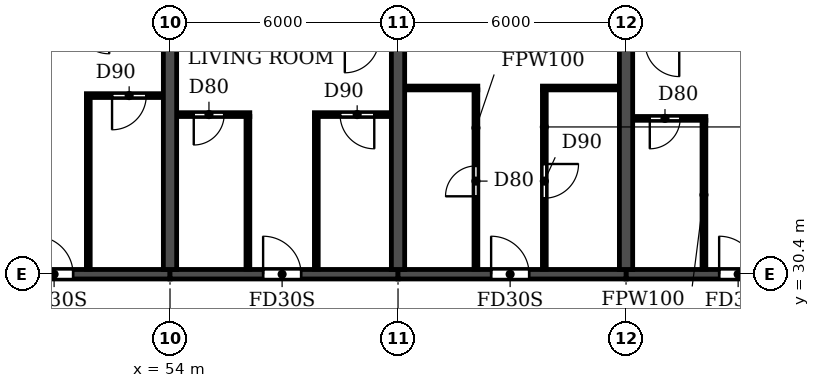
"""IFC4 building model, lengths in metres.
Left out: names, types, materials, properties, quantities, classifications, styles, units other than length and angle.
Written with IfcOpenShell. Run it as: python <this file> out.ifc"""

import sys

from ifc_helpers import new_model, si_unit, direction, frame, frame_2d, origin, place, context, subcontext, project, spatial, rectangle, extrude, element, fill, save


model = new_model("IFC4")
c1 = context("Model", 3, precision=1e-05, world=origin(), true_north=direction((0.0, 1.0)))
c2 = subcontext(c1, "Body", "Model", "MODEL_VIEW")
j1 = project(units=[si_unit("LENGTHUNIT", "METRE"), si_unit("PLANEANGLEUNIT", "RADIAN")], contexts=[c1])
p1 = place(None, origin())
s1 = spatial("IfcSite", under=j1, at=p1, CompositionType="ELEMENT")
p2 = place(p1, origin())
s2 = spatial("IfcBuilding", under=s1, at=p2, CompositionType="ELEMENT")
p3 = place(p2, frame((0.0, 0.0, 112.5)))
s3 = spatial("IfcBuildingStorey", under=s2, at=p3, CompositionType="ELEMENT", Elevation=112.5)
for number, where, z_axis, x_axis in (
    (1, (54.0, 30.525, 0.0), (0.0, 0.0, 1.0), (0.0, 1.0, 0.0)),
    (2, (60.0, 30.525, 0.0), (0.0, 0.0, 1.0), (0.0, 1.0, 0.0)),
    (3, (66.0, 30.525, 0.0), (0.0, 0.0, 1.0), (0.0, 1.0, 0.0)),
):
    element("IfcWall", number, at=place(p3, frame(where, z_axis=z_axis, x_axis=x_axis)), inside=s3, PredefinedType="SHEAR", context=c2, shape_type="SweptSolid", body=[
        extrude(rectangle(XDim=12.875, YDim=0.35, at=frame_2d((6.438, 0.0))), origin(), (0.0, 0.0, 1.0), 2.95),
    ])
p4 = place(p3, frame((48.0, 30.4, 0.0), z_axis=(0.0, 0.0, 1.0), x_axis=(1.0, 0.0, 0.0)))
e4 = element("IfcWall", 4, at=p4, inside=s3, PredefinedType="SHEAR", context=c2, shape_type="SweptSolid", body=[
    extrude(rectangle(XDim=6.0, YDim=0.25, at=frame_2d((3.0, 0.0))), origin(), (0.0, 0.0, 1.0), 2.35),
])
p5 = place(p4, frame((2.45, 0.0, 0.0)))
e5 = element("IfcOpeningElement", 5, at=p5, cuts=e4, PredefinedType="OPENING", context=c2, shape_type="SweptSolid", body=[
    extrude(rectangle(XDim=1.0, YDim=2.1, at=frame_2d((0.5, 1.05))), frame((0.0, 0.135, 0.0), z_axis=(0.0, -1.0, 0.0), x_axis=(1.0, 0.0, 0.0)), (0.0, 0.0, 1.0), 0.27),
])
p6 = place(p3, frame((54.0, 30.4, 0.0), z_axis=(0.0, 0.0, 1.0), x_axis=(1.0, 0.0, 0.0)))
e6 = element("IfcWall", 6, at=p6, inside=s3, PredefinedType="SHEAR", context=c2, shape_type="SweptSolid", body=[
    extrude(rectangle(XDim=6.0, YDim=0.25, at=frame_2d((3.0, 0.0))), origin(), (0.0, 0.0, 1.0), 2.35),
])
p7 = place(p6, frame((2.45, 0.0, 0.0)))
e7 = element("IfcOpeningElement", 7, at=p7, cuts=e6, PredefinedType="OPENING", context=c2, shape_type="SweptSolid", body=[
    extrude(rectangle(XDim=1.0, YDim=2.1, at=frame_2d((0.5, 1.05))), frame((0.0, 0.135, 0.0), z_axis=(0.0, -1.0, 0.0), x_axis=(1.0, 0.0, 0.0)), (0.0, 0.0, 1.0), 0.27),
])
p8 = place(p3, frame((60.0, 30.4, 0.0), z_axis=(0.0, 0.0, 1.0), x_axis=(1.0, 0.0, 0.0)))
e8 = element("IfcWall", 8, at=p8, inside=s3, PredefinedType="SHEAR", context=c2, shape_type="SweptSolid", body=[
    extrude(rectangle(XDim=6.0, YDim=0.25, at=frame_2d((3.0, 0.0))), origin(), (0.0, 0.0, 1.0), 2.35),
])
p9 = place(p8, frame((2.45, 0.0, 0.0)))
e9 = element("IfcOpeningElement", 9, at=p9, cuts=e8, PredefinedType="OPENING", context=c2, shape_type="SweptSolid", body=[
    extrude(rectangle(XDim=1.0, YDim=2.1, at=frame_2d((0.5, 1.05))), frame((0.0, 0.135, 0.0), z_axis=(0.0, -1.0, 0.0), x_axis=(1.0, 0.0, 0.0)), (0.0, 0.0, 1.0), 0.27),
])
p10 = place(p3, frame((66.0, 30.4, 0.0), z_axis=(0.0, 0.0, 1.0), x_axis=(1.0, 0.0, 0.0)))
e10 = element("IfcWall", 10, at=p10, inside=s3, PredefinedType="SHEAR", context=c2, shape_type="SweptSolid", body=[
    extrude(rectangle(XDim=6.0, YDim=0.25, at=frame_2d((3.0, 0.0))), origin(), (0.0, 0.0, 1.0), 2.35),
])
p11 = place(p10, frame((2.45, 0.0, 0.0)))
e11 = element("IfcOpeningElement", 11, at=p11, cuts=e10, PredefinedType="OPENING", context=c2, shape_type="SweptSolid", body=[
    extrude(rectangle(XDim=1.0, YDim=2.1, at=frame_2d((0.5, 1.05))), frame((0.0, 0.135, 0.0), z_axis=(0.0, -1.0, 0.0), x_axis=(1.0, 0.0, 0.0)), (0.0, 0.0, 1.0), 0.27),
])
p12 = place(p3, frame((66.185, 34.5, 0.0), z_axis=(0.0, 0.0, 1.0), x_axis=(1.0, 0.0, 0.0)))
e12 = element("IfcWall", 12, at=p12, inside=s3, PredefinedType="PARTITIONING", context=c2, shape_type="SweptSolid", body=[
    extrude(rectangle(XDim=1.915, YDim=0.1, at=frame_2d((0.958, 0.0))), origin(), (0.0, 0.0, 1.0), 2.95),
])
p13 = place(p12, frame((0.44, 0.0, 0.0)))
e13 = element("IfcOpeningElement", 13, at=p13, cuts=e12, PredefinedType="OPENING", context=c2, shape_type="SweptSolid", body=[
    extrude(rectangle(XDim=0.8, YDim=2.1, at=frame_2d((0.4, 1.05))), frame((0.0, 0.06, 0.0), z_axis=(0.0, -1.0, 0.0), x_axis=(1.0, 0.0, 0.0)), (0.0, 0.0, 1.0), 0.12),
])
p14 = place(p3, frame((54.185, 34.6, 0.0), z_axis=(0.0, 0.0, 1.0), x_axis=(1.0, 0.0, 0.0)))
e14 = element("IfcWall", 14, at=p14, inside=s3, PredefinedType="PARTITIONING", context=c2, shape_type="SweptSolid", body=[
    extrude(rectangle(XDim=1.915, YDim=0.1, at=frame_2d((0.958, 0.0))), origin(), (0.0, 0.0, 1.0), 2.95),
])
p15 = place(p14, frame((0.44, 0.0, 0.0)))
e15 = element("IfcOpeningElement", 15, at=p15, cuts=e14, PredefinedType="OPENING", context=c2, shape_type="SweptSolid", body=[
    extrude(rectangle(XDim=0.8, YDim=2.1, at=frame_2d((0.4, 1.05))), frame((0.0, 0.06, 0.0), z_axis=(0.0, -1.0, 0.0), x_axis=(1.0, 0.0, 0.0)), (0.0, 0.0, 1.0), 0.12),
])
p16 = place(p3, frame((57.8, 34.6, 0.0), z_axis=(0.0, 0.0, 1.0), x_axis=(1.0, 0.0, 0.0)))
e16 = element("IfcWall", 16, at=p16, inside=s3, PredefinedType="PARTITIONING", context=c2, shape_type="SweptSolid", body=[
    extrude(rectangle(XDim=2.015, YDim=0.1, at=frame_2d((1.007, 0.0))), origin(), (0.0, 0.0, 1.0), 2.95),
])
p17 = place(p16, frame((0.675, 0.0, 0.0)))
e17 = element("IfcOpeningElement", 17, at=p17, cuts=e16, PredefinedType="OPENING", context=c2, shape_type="SweptSolid", body=[
    extrude(rectangle(XDim=0.9, YDim=2.1, at=frame_2d((0.45, 1.05))), frame((0.0, 0.06, 0.0), z_axis=(0.0, -1.0, 0.0), x_axis=(1.0, 0.0, 0.0)), (0.0, 0.0, 1.0), 0.12),
])
p18 = place(p3, frame((51.8, 35.1, 0.0), z_axis=(0.0, 0.0, 1.0), x_axis=(1.0, 0.0, 0.0)))
e18 = element("IfcWall", 18, at=p18, inside=s3, PredefinedType="PARTITIONING", context=c2, shape_type="SweptSolid", body=[
    extrude(rectangle(XDim=2.015, YDim=0.1, at=frame_2d((1.007, 0.0))), origin(), (0.0, 0.0, 1.0), 2.95),
])
p19 = place(p18, frame((0.675, 0.0, 0.0)))
e19 = element("IfcOpeningElement", 19, at=p19, cuts=e18, PredefinedType="OPENING", context=c2, shape_type="SweptSolid", body=[
    extrude(rectangle(XDim=0.9, YDim=2.1, at=frame_2d((0.45, 1.05))), frame((0.0, 0.06, 0.0), z_axis=(0.0, -1.0, 0.0), x_axis=(1.0, 0.0, 0.0)), (0.0, 0.0, 1.0), 0.12),
])
p20 = place(p3, frame((60.185, 35.3, 0.0), z_axis=(0.0, 0.0, 1.0), x_axis=(1.0, 0.0, 0.0)))
e20 = element("IfcWall", 20, at=p20, inside=s3, PredefinedType="PARTITIONING", context=c2, shape_type="SweptSolid", body=[
    extrude(rectangle(XDim=1.915, YDim=0.1, at=frame_2d((0.958, 0.0))), origin(), (0.0, 0.0, 1.0), 2.95),
])
p21 = place(p3, frame((63.8, 35.3, 0.0), z_axis=(0.0, 0.0, 1.0), x_axis=(1.0, 0.0, 0.0)))
e21 = element("IfcWall", 21, at=p21, inside=s3, PredefinedType="PARTITIONING", context=c2, shape_type="SweptSolid", body=[
    extrude(rectangle(XDim=2.015, YDim=0.1, at=frame_2d((1.007, 0.0))), origin(), (0.0, 0.0, 1.0), 2.95),
])
p22 = place(p3, frame((51.85, 30.535, 0.0), z_axis=(0.0, 0.0, 1.0), x_axis=(0.0, 1.0, 0.0)))
e22 = element("IfcWall", 22, at=p22, inside=s3, PredefinedType="PARTITIONING", context=c2, shape_type="SweptSolid", body=[
    extrude(rectangle(XDim=4.515, YDim=0.1, at=frame_2d((2.258, 0.0))), origin(), (0.0, 0.0, 1.0), 2.95),
])
for number, where, z_axis, x_axis in (
    (23, (56.05, 30.535, 0.0), (0.0, 0.0, 1.0), (0.0, 1.0, 0.0)),
    (24, (57.85, 30.535, 0.0), (0.0, 0.0, 1.0), (0.0, 1.0, 0.0)),
):
    element("IfcWall", number, at=place(p3, frame(where, z_axis=z_axis, x_axis=x_axis)), inside=s3, PredefinedType="PARTITIONING", context=c2, shape_type="SweptSolid", body=[
        extrude(rectangle(XDim=4.015, YDim=0.1, at=frame_2d((2.008, 0.0))), origin(), (0.0, 0.0, 1.0), 2.95),
    ])
p23 = place(p3, frame((62.05, 30.535, 0.0), z_axis=(0.0, 0.0, 1.0), x_axis=(0.0, 1.0, 0.0)))
e25 = element("IfcWall", 25, at=p23, inside=s3, PredefinedType="PARTITIONING", context=c2, shape_type="SweptSolid", body=[
    extrude(rectangle(XDim=4.715, YDim=0.1, at=frame_2d((2.357, 0.0))), origin(), (0.0, 0.0, 1.0), 2.95),
])
p24 = place(p23, frame((1.915, 0.0, 0.0)))
e26 = element("IfcOpeningElement", 26, at=p24, cuts=e25, PredefinedType="OPENING", context=c2, shape_type="SweptSolid", body=[
    extrude(rectangle(XDim=0.8, YDim=2.1, at=frame_2d((0.4, 1.05))), frame((0.0, 0.06, 0.0), z_axis=(0.0, -1.0, 0.0), x_axis=(1.0, 0.0, 0.0)), (0.0, 0.0, 1.0), 0.12),
])
p25 = place(p3, frame((63.85, 30.535, 0.0), z_axis=(0.0, 0.0, 1.0), x_axis=(0.0, 1.0, 0.0)))
e27 = element("IfcWall", 27, at=p25, inside=s3, PredefinedType="PARTITIONING", context=c2, shape_type="SweptSolid", body=[
    extrude(rectangle(XDim=4.715, YDim=0.1, at=frame_2d((2.357, 0.0))), origin(), (0.0, 0.0, 1.0), 2.95),
])
p26 = place(p25, frame((1.865, 0.0, 0.0)))
e28 = element("IfcOpeningElement", 28, at=p26, cuts=e27, PredefinedType="OPENING", context=c2, shape_type="SweptSolid", body=[
    extrude(rectangle(XDim=0.9, YDim=2.1, at=frame_2d((0.45, 1.05))), frame((0.0, 0.06, 0.0), z_axis=(0.0, -1.0, 0.0), x_axis=(1.0, 0.0, 0.0)), (0.0, 0.0, 1.0), 0.12),
])
p27 = place(p3, frame((68.05, 30.535, 0.0), z_axis=(0.0, 0.0, 1.0), x_axis=(0.0, 1.0, 0.0)))
e29 = element("IfcWall", 29, at=p27, inside=s3, PredefinedType="PARTITIONING", context=c2, shape_type="SweptSolid", body=[
    extrude(rectangle(XDim=3.915, YDim=0.1, at=frame_2d((1.958, 0.0))), origin(), (0.0, 0.0, 1.0), 2.95),
])
p28 = place(p5, origin())
e30 = element("IfcDoor", 30, at=p28, inside=s3, OperationType="SINGLE_SWING_LEFT", PredefinedType="DOOR", context=c2, shape_type="SweptSolid", body=[
    extrude(rectangle(XDim=1.0, YDim=2.1, at=frame_2d((0.5, 1.05))), frame((0.0, 0.025, 0.0), z_axis=(0.0, -1.0, 0.0), x_axis=(1.0, 0.0, 0.0)), (0.0, 0.0, 1.0), 0.05),
])
fill(e5, e30)
p29 = place(p19, frame((0.9, 0.0, 0.0), z_axis=(0.0, 0.0, 1.0), x_axis=(-1.0, 0.0, 0.0)))
e31 = element("IfcDoor", 31, at=p29, inside=s3, OperationType="SINGLE_SWING_RIGHT", PredefinedType="DOOR", context=c2, shape_type="SweptSolid", body=[
    extrude(rectangle(XDim=0.9, YDim=2.1, at=frame_2d((0.45, 1.05))), frame((0.0, 0.025, 0.0), z_axis=(0.0, -1.0, 0.0), x_axis=(1.0, 0.0, 0.0)), (0.0, 0.0, 1.0), 0.05),
])
fill(e19, e31)
p30 = place(p15, frame((0.8, 0.0, 0.0), z_axis=(0.0, 0.0, 1.0), x_axis=(-1.0, 0.0, 0.0)))
e32 = element("IfcDoor", 32, at=p30, inside=s3, OperationType="SINGLE_SWING_RIGHT", PredefinedType="DOOR", context=c2, shape_type="SweptSolid", body=[
    extrude(rectangle(XDim=0.8, YDim=2.1, at=frame_2d((0.4, 1.05))), frame((0.0, 0.025, 0.0), z_axis=(0.0, -1.0, 0.0), x_axis=(1.0, 0.0, 0.0)), (0.0, 0.0, 1.0), 0.05),
])
fill(e15, e32)
p31 = place(p7, origin())
e33 = element("IfcDoor", 33, at=p31, inside=s3, OperationType="SINGLE_SWING_LEFT", PredefinedType="DOOR", context=c2, shape_type="SweptSolid", body=[
    extrude(rectangle(XDim=1.0, YDim=2.1, at=frame_2d((0.5, 1.05))), frame((0.0, 0.025, 0.0), z_axis=(0.0, -1.0, 0.0), x_axis=(1.0, 0.0, 0.0)), (0.0, 0.0, 1.0), 0.05),
])
fill(e7, e33)
p32 = place(p17, frame((0.9, 0.0, 0.0), z_axis=(0.0, 0.0, 1.0), x_axis=(-1.0, 0.0, 0.0)))
e34 = element("IfcDoor", 34, at=p32, inside=s3, OperationType="SINGLE_SWING_LEFT", PredefinedType="DOOR", context=c2, shape_type="SweptSolid", body=[
    extrude(rectangle(XDim=0.9, YDim=2.1, at=frame_2d((0.45, 1.05))), frame((0.0, 0.025, 0.0), z_axis=(0.0, -1.0, 0.0), x_axis=(1.0, 0.0, 0.0)), (0.0, 0.0, 1.0), 0.05),
])
fill(e17, e34)
p33 = place(p24, origin())
e35 = element("IfcDoor", 35, at=p33, inside=s3, OperationType="SINGLE_SWING_LEFT", PredefinedType="DOOR", context=c2, shape_type="SweptSolid", body=[
    extrude(rectangle(XDim=0.8, YDim=2.1, at=frame_2d((0.4, 1.05))), frame((0.0, 0.025, 0.0), z_axis=(0.0, -1.0, 0.0), x_axis=(1.0, 0.0, 0.0)), (0.0, 0.0, 1.0), 0.05),
])
fill(e26, e35)
p34 = place(p9, origin())
e36 = element("IfcDoor", 36, at=p34, inside=s3, OperationType="SINGLE_SWING_LEFT", PredefinedType="DOOR", context=c2, shape_type="SweptSolid", body=[
    extrude(rectangle(XDim=1.0, YDim=2.1, at=frame_2d((0.5, 1.05))), frame((0.0, 0.025, 0.0), z_axis=(0.0, -1.0, 0.0), x_axis=(1.0, 0.0, 0.0)), (0.0, 0.0, 1.0), 0.05),
])
fill(e9, e36)
p35 = place(p26, frame((0.9, 0.0, 0.0), z_axis=(0.0, 0.0, 1.0), x_axis=(-1.0, 0.0, 0.0)))
e37 = element("IfcDoor", 37, at=p35, inside=s3, OperationType="SINGLE_SWING_LEFT", PredefinedType="DOOR", context=c2, shape_type="SweptSolid", body=[
    extrude(rectangle(XDim=0.9, YDim=2.1, at=frame_2d((0.45, 1.05))), frame((0.0, 0.025, 0.0), z_axis=(0.0, -1.0, 0.0), x_axis=(1.0, 0.0, 0.0)), (0.0, 0.0, 1.0), 0.05),
])
fill(e28, e37)
p36 = place(p13, frame((0.8, 0.0, 0.0), z_axis=(0.0, 0.0, 1.0), x_axis=(-1.0, 0.0, 0.0)))
e38 = element("IfcDoor", 38, at=p36, inside=s3, OperationType="SINGLE_SWING_RIGHT", PredefinedType="DOOR", context=c2, shape_type="SweptSolid", body=[
    extrude(rectangle(XDim=0.8, YDim=2.1, at=frame_2d((0.4, 1.05))), frame((0.0, 0.025, 0.0), z_axis=(0.0, -1.0, 0.0), x_axis=(1.0, 0.0, 0.0)), (0.0, 0.0, 1.0), 0.05),
])
fill(e13, e38)
p37 = place(p11, origin())
e39 = element("IfcDoor", 39, at=p37, inside=s3, OperationType="SINGLE_SWING_LEFT", PredefinedType="DOOR", context=c2, shape_type="SweptSolid", body=[
    extrude(rectangle(XDim=1.0, YDim=2.1, at=frame_2d((0.5, 1.05))), frame((0.0, 0.025, 0.0), z_axis=(0.0, -1.0, 0.0), x_axis=(1.0, 0.0, 0.0)), (0.0, 0.0, 1.0), 0.05),
])
fill(e11, e39)
save(model, sys.argv[1])
